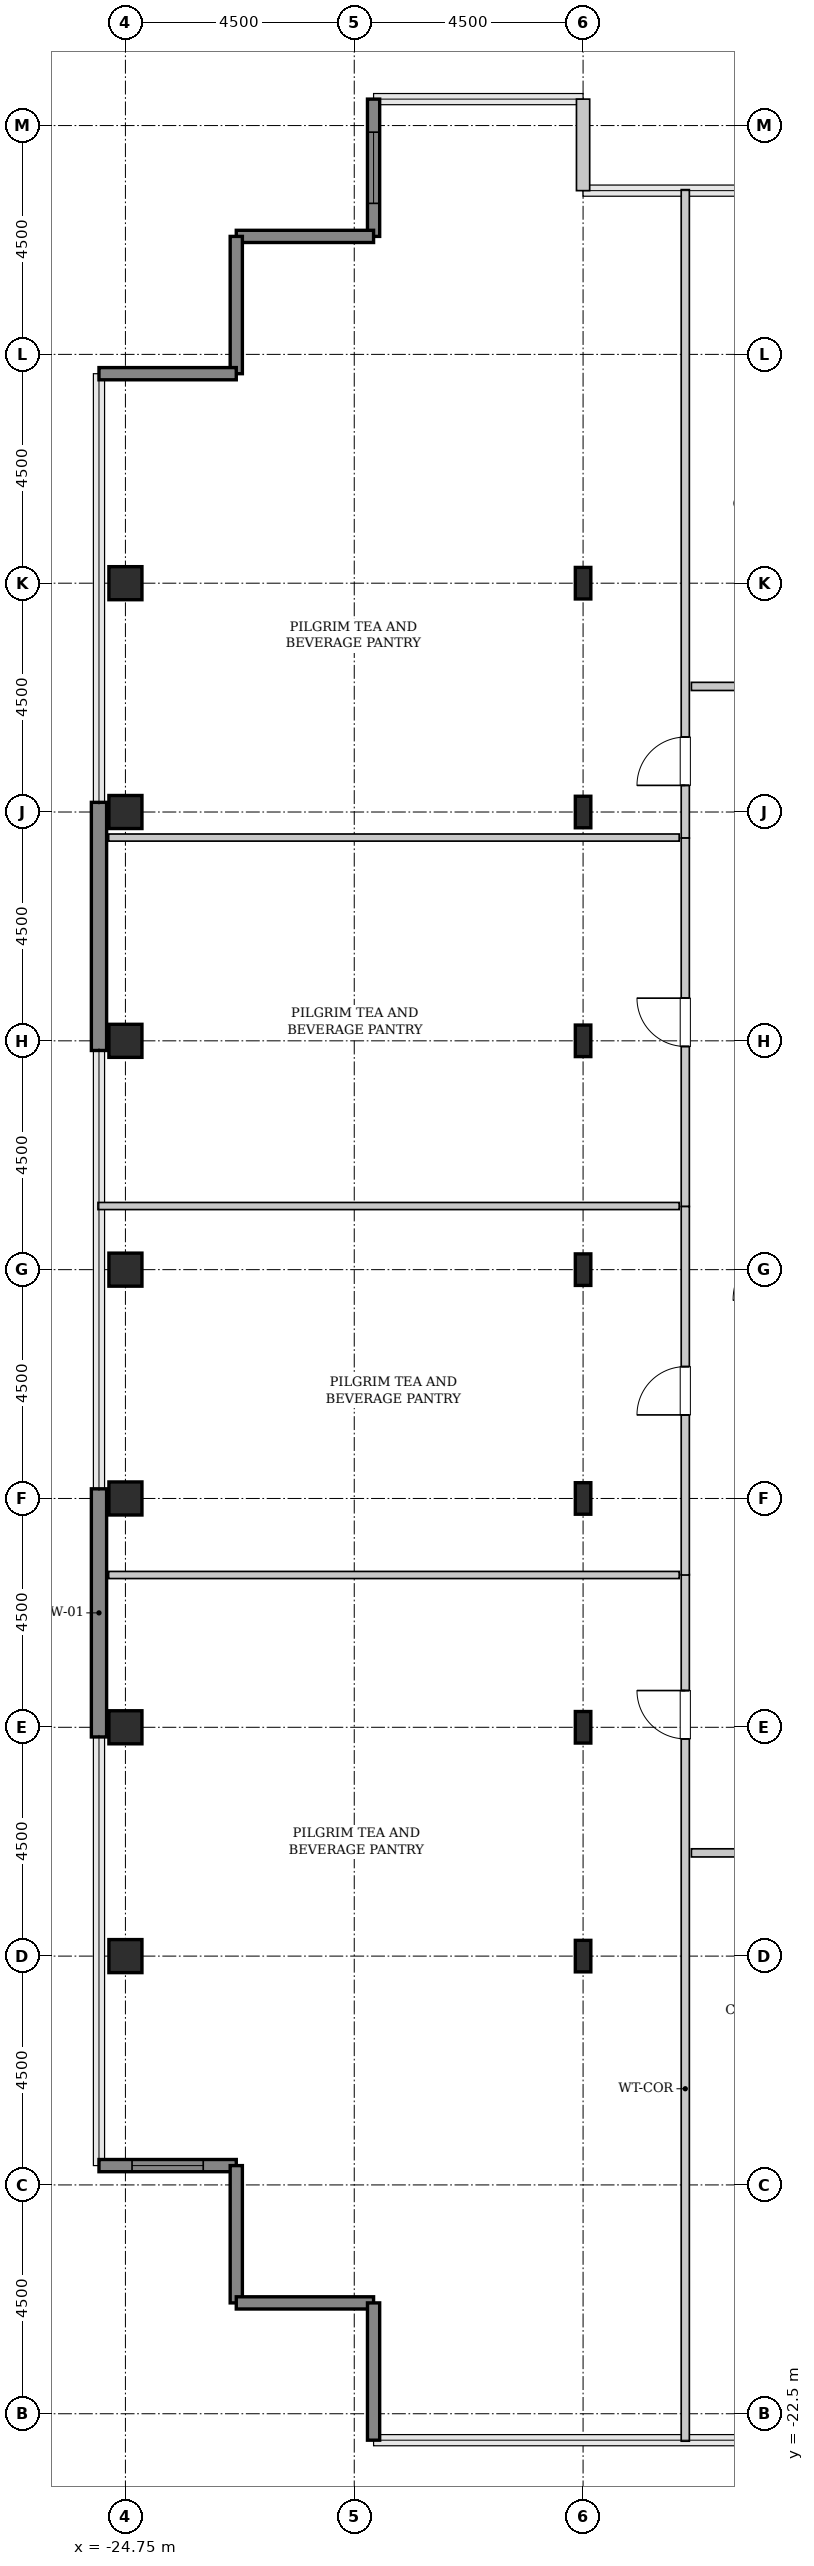
"""IFC4 building model, lengths in metres.
Left out: names, types, materials, properties, quantities, classifications, styles, units other than length and angle.
Written with IfcOpenShell. Run it as: python <this file> out.ifc"""

import sys

from ifc_helpers import new_model, si_unit, direction, frame, frame_2d, origin, origin_2d, place, context, subcontext, project, spatial, rectangle, hollow_rectangle, i_section, extrude, source, transform, mapped, element, fill, save


model = new_model("IFC4")
c1 = context("Model", 3, precision=1e-05, world=origin(), true_north=direction((0.0, 1.0)))
c2 = subcontext(c1, "Body", "Model", "MODEL_VIEW")
j1 = project(units=[si_unit("LENGTHUNIT", "METRE"), si_unit("PLANEANGLEUNIT", "RADIAN")], contexts=[c1])
p1 = place(None, origin())
s1 = spatial("IfcSite", under=j1, at=p1, CompositionType="ELEMENT")
p2 = place(p1, origin())
s2 = spatial("IfcBuilding", under=s1, at=p2, CompositionType="ELEMENT")
p3 = place(p2, frame((0.0, 0.0, 287.4)))
s3 = spatial("IfcBuildingStorey", under=s2, at=p3, CompositionType="ELEMENT", Elevation=287.4)
m1 = source(origin(), c2, "Body", "SweptSolid", [
    extrude(hollow_rectangle(XDim=0.65, YDim=0.65, WallThickness=0.032, InnerFilletRadius=0.032, OuterFilletRadius=0.064, at=origin_2d()), origin(), (0.0, 0.0, 1.0), 3.8),
])
for number, where, z_axis, x_axis in (
    (1, (-24.75, -13.5, 0.0), (0.0, 0.0, 1.0), (1.0, 0.0, 0.0)),
    (2, (-24.75, -9.0, 0.0), (0.0, 0.0, 1.0), (1.0, 0.0, 0.0)),
    (3, (-24.75, -4.5, 0.0), (0.0, 0.0, 1.0), (1.0, 0.0, 0.0)),
    (4, (-24.75, 0.0, 0.0), (0.0, 0.0, 1.0), (1.0, 0.0, 0.0)),
    (5, (-24.75, 4.5, 0.0), (0.0, 0.0, 1.0), (1.0, 0.0, 0.0)),
    (6, (-24.75, 9.0, 0.0), (0.0, 0.0, 1.0), (1.0, 0.0, 0.0)),
    (7, (-24.75, 13.5, 0.0), (0.0, 0.0, 1.0), (1.0, 0.0, 0.0)),
):
    element("IfcColumn", number, at=place(p3, frame(where, z_axis=z_axis, x_axis=x_axis)), inside=s3, PredefinedType="COLUMN", context=c2, shape_type="MappedRepresentation", body=[
        mapped(m1, transform((0.0, 0.0, 0.0), x_axis=(1.0, 0.0, 0.0), y_axis=(0.0, 1.0, 0.0), z_axis=(0.0, 0.0, 1.0), scale=1.0)),
    ])
m2 = source(origin(), c2, "Body", "SweptSolid", [
    extrude(i_section(OverallWidth=0.305, OverallDepth=0.62, WebThickness=0.021, FlangeThickness=0.04, FilletRadius=0.027, at=origin_2d()), origin(), (0.0, 0.0, 1.0), 3.8),
])
for number, where, z_axis, x_axis in (
    (8, (-15.75, -13.5, 0.0), (0.0, 0.0, 1.0), (1.0, 0.0, 0.0)),
    (9, (-15.75, -9.0, 0.0), (0.0, 0.0, 1.0), (1.0, 0.0, 0.0)),
    (10, (-15.75, -4.5, 0.0), (0.0, 0.0, 1.0), (1.0, 0.0, 0.0)),
    (11, (-15.75, 0.0, 0.0), (0.0, 0.0, 1.0), (1.0, 0.0, 0.0)),
    (12, (-15.75, 4.5, 0.0), (0.0, 0.0, 1.0), (1.0, 0.0, 0.0)),
    (13, (-15.75, 9.0, 0.0), (0.0, 0.0, 1.0), (1.0, 0.0, 0.0)),
    (14, (-15.75, 13.5, 0.0), (0.0, 0.0, 1.0), (1.0, 0.0, 0.0)),
):
    element("IfcColumn", number, at=place(p3, frame(where, z_axis=z_axis, x_axis=x_axis)), inside=s3, PredefinedType="COLUMN", context=c2, shape_type="MappedRepresentation", body=[
        mapped(m2, transform((0.0, 0.0, 0.0), x_axis=(1.0, 0.0, 0.0), y_axis=(0.0, 1.0, 0.0), z_axis=(0.0, 0.0, 1.0), scale=1.0)),
    ])
m3 = source(origin(), c2, "Body", "SweptSolid", [
    extrude(rectangle(XDim=4.88, YDim=0.3, at=frame_2d((2.44, 0.0))), origin(), (0.0, 0.0, 1.0), 3.55),
])
for number, where, z_axis, x_axis in (
    (15, (-25.27, -9.19, 0.0), (0.0, 0.0, 1.0), (0.0, 1.0, 0.0)),
    (16, (-25.27, 4.31, 0.0), (0.0, 0.0, 1.0), (0.0, 1.0, 0.0)),
):
    element("IfcWall", number, at=place(p3, frame(where, z_axis=z_axis, x_axis=x_axis)), inside=s3, PredefinedType="SHEAR", context=c2, shape_type="MappedRepresentation", body=[
        mapped(m3, transform((0.0, 0.0, 0.0), x_axis=(1.0, 0.0, 0.0), y_axis=(0.0, 1.0, 0.0), z_axis=(0.0, 0.0, 1.0), scale=1.0)),
    ])
m4 = source(origin(), c2, "Body", "SweptSolid", [
    extrude(rectangle(XDim=1.8, YDim=0.26, at=frame_2d((0.9, 0.0))), origin(), (0.0, 0.0, 1.0), 3.55),
])
p4 = place(p3, frame((-15.75, 21.22, 0.0), z_axis=(0.0, 0.0, 1.0), x_axis=(0.0, 1.0, 0.0)))
e17 = element("IfcWall", 17, at=p4, inside=s3, PredefinedType="SOLIDWALL", context=c2, shape_type="MappedRepresentation", body=[
    mapped(m4, transform((0.0, 0.0, 0.0), x_axis=(1.0, 0.0, 0.0), y_axis=(0.0, 1.0, 0.0), z_axis=(0.0, 0.0, 1.0), scale=1.0)),
])
m5 = source(origin(), c2, "Body", "SweptSolid", [
    extrude(rectangle(XDim=2.7, YDim=0.24, at=frame_2d((1.35, 0.0))), origin(), (0.0, 0.0, 1.0), 3.55),
])
p5 = place(p3, frame((-19.87, 23.02, 0.0), z_axis=(0.0, 0.0, 1.0), x_axis=(0.0, -1.0, 0.0)))
e18 = element("IfcWall", 18, at=p5, inside=s3, PredefinedType="SHEAR", context=c2, shape_type="MappedRepresentation", body=[
    mapped(m5, transform((0.0, 0.0, 0.0), x_axis=(1.0, 0.0, 0.0), y_axis=(0.0, 1.0, 0.0), z_axis=(0.0, 0.0, 1.0), scale=1.0)),
])
p6 = place(p5, frame((0.65, 0.0, 0.85)))
e19 = element("IfcOpeningElement", 19, at=p6, cuts=e18, PredefinedType="OPENING", context=c2, shape_type="SweptSolid", body=[
    extrude(rectangle(XDim=1.4, YDim=1.8, at=frame_2d((0.7, 0.9))), frame((0.0, 0.13, 0.0), z_axis=(0.0, -1.0, 0.0), x_axis=(1.0, 0.0, 0.0)), (0.0, 0.0, 1.0), 0.26),
])
for number, where, z_axis, x_axis in (
    (20, (-19.87, 20.32, 0.0), (0.0, 0.0, 1.0), (-1.0, 0.0, 0.0)),
    (21, (-22.57, 20.32, 0.0), (0.0, 0.0, 1.0), (0.0, -1.0, 0.0)),
    (22, (-22.57, 17.62, 0.0), (0.0, 0.0, 1.0), (-1.0, 0.0, 0.0)),
):
    element("IfcWall", number, at=place(p3, frame(where, z_axis=z_axis, x_axis=x_axis)), inside=s3, PredefinedType="SHEAR", context=c2, shape_type="MappedRepresentation", body=[
        mapped(m5, transform((0.0, 0.0, 0.0), x_axis=(1.0, 0.0, 0.0), y_axis=(0.0, 1.0, 0.0), z_axis=(0.0, 0.0, 1.0), scale=1.0)),
    ])
p7 = place(p3, frame((-25.27, -17.62, 0.0), z_axis=(0.0, 0.0, 1.0), x_axis=(1.0, 0.0, 0.0)))
e23 = element("IfcWall", 23, at=p7, inside=s3, PredefinedType="SHEAR", context=c2, shape_type="MappedRepresentation", body=[
    mapped(m5, transform((0.0, 0.0, 0.0), x_axis=(1.0, 0.0, 0.0), y_axis=(0.0, 1.0, 0.0), z_axis=(0.0, 0.0, 1.0), scale=1.0)),
])
p8 = place(p7, frame((0.65, 0.0, 0.85)))
e24 = element("IfcOpeningElement", 24, at=p8, cuts=e23, PredefinedType="OPENING", context=c2, shape_type="SweptSolid", body=[
    extrude(rectangle(XDim=1.4, YDim=1.8, at=frame_2d((0.7, 0.9))), frame((0.0, 0.13, 0.0), z_axis=(0.0, -1.0, 0.0), x_axis=(1.0, 0.0, 0.0)), (0.0, 0.0, 1.0), 0.26),
])
for number, where, z_axis, x_axis in (
    (25, (-22.57, -17.62, 0.0), (0.0, 0.0, 1.0), (0.0, -1.0, 0.0)),
    (26, (-22.57, -20.32, 0.0), (0.0, 0.0, 1.0), (1.0, 0.0, 0.0)),
    (27, (-19.87, -20.32, 0.0), (0.0, 0.0, 1.0), (0.0, -1.0, 0.0)),
):
    element("IfcWall", number, at=place(p3, frame(where, z_axis=z_axis, x_axis=x_axis)), inside=s3, PredefinedType="SHEAR", context=c2, shape_type="MappedRepresentation", body=[
        mapped(m5, transform((0.0, 0.0, 0.0), x_axis=(1.0, 0.0, 0.0), y_axis=(0.0, 1.0, 0.0), z_axis=(0.0, 0.0, 1.0), scale=1.0)),
    ])
m6 = source(origin(), c2, "Body", "SweptSolid", [
    extrude(rectangle(XDim=17.045, YDim=0.16, at=frame_2d((8.522, 0.0))), origin(), (0.0, 0.0, 1.0), 3.535),
])
p9 = place(p3, frame((-13.74, -23.04, 0.0), z_axis=(0.0, 0.0, 1.0), x_axis=(0.0, 1.0, 0.0)))
e28 = element("IfcWall", 28, at=p9, inside=s3, PredefinedType="PARTITIONING", context=c2, shape_type="MappedRepresentation", body=[
    mapped(m6, transform((0.0, 0.0, 0.0), x_axis=(1.0, 0.0, 0.0), y_axis=(0.0, 1.0, 0.0), z_axis=(0.0, 0.0, 1.0), scale=1.0)),
])
p10 = place(p9, frame((13.812, 0.0, 0.0)))
e29 = element("IfcOpeningElement", 29, at=p10, cuts=e28, PredefinedType="OPENING", context=c2, shape_type="SweptSolid", body=[
    extrude(rectangle(XDim=0.95, YDim=2.1, at=frame_2d((0.475, 1.05))), frame((0.0, 0.09, 0.0), z_axis=(0.0, -1.0, 0.0), x_axis=(1.0, 0.0, 0.0)), (0.0, 0.0, 1.0), 0.18),
])
m7 = source(origin(), c2, "Body", "SweptSolid", [
    extrude(rectangle(XDim=11.22, YDim=0.14, at=frame_2d((5.61, 0.0))), origin(), (0.0, 0.0, 1.0), 3.535),
])
p11 = place(p3, frame((-25.08, -6.005, 0.0), z_axis=(0.0, 0.0, 1.0), x_axis=(1.0, 0.0, 0.0)))
e30 = element("IfcWall", 30, at=p11, inside=s3, PredefinedType="PARTITIONING", context=c2, shape_type="MappedRepresentation", body=[
    mapped(m7, transform((0.0, 0.0, 0.0), x_axis=(1.0, 0.0, 0.0), y_axis=(0.0, 1.0, 0.0), z_axis=(0.0, 0.0, 1.0), scale=1.0)),
])
m8 = source(origin(), c2, "Body", "SweptSolid", [
    extrude(rectangle(XDim=12.752, YDim=0.16, at=frame_2d((6.376, 0.0))), origin(), (0.0, 0.0, 1.0), 3.535),
])
p12 = place(p3, frame((-13.74, 8.488, 0.0), z_axis=(0.0, 0.0, 1.0), x_axis=(0.0, 1.0, 0.0)))
e31 = element("IfcWall", 31, at=p12, inside=s3, PredefinedType="PARTITIONING", context=c2, shape_type="MappedRepresentation", body=[
    mapped(m8, transform((0.0, 0.0, 0.0), x_axis=(1.0, 0.0, 0.0), y_axis=(0.0, 1.0, 0.0), z_axis=(0.0, 0.0, 1.0), scale=1.0)),
])
p13 = place(p12, frame((1.036, 0.0, 0.0)))
e32 = element("IfcOpeningElement", 32, at=p13, cuts=e31, PredefinedType="OPENING", context=c2, shape_type="SweptSolid", body=[
    extrude(rectangle(XDim=0.95, YDim=2.1, at=frame_2d((0.475, 1.05))), frame((0.0, 0.09, 0.0), z_axis=(0.0, -1.0, 0.0), x_axis=(1.0, 0.0, 0.0)), (0.0, 0.0, 1.0), 0.18),
])
m9 = source(origin(), c2, "Body", "SweptSolid", [
    extrude(rectangle(XDim=11.22, YDim=0.14, at=frame_2d((5.61, 0.0))), origin(), (0.0, 0.0, 1.0), 2.925),
])
p14 = place(p3, frame((-25.08, 8.498, 0.0), z_axis=(0.0, 0.0, 1.0), x_axis=(1.0, 0.0, 0.0)))
e33 = element("IfcWall", 33, at=p14, inside=s3, PredefinedType="PARTITIONING", context=c2, shape_type="MappedRepresentation", body=[
    mapped(m9, transform((0.0, 0.0, 0.0), x_axis=(1.0, 0.0, 0.0), y_axis=(0.0, 1.0, 0.0), z_axis=(0.0, 0.0, 1.0), scale=1.0)),
])
m10 = source(origin(), c2, "Body", "SweptSolid", [
    extrude(rectangle(XDim=7.246, YDim=0.16, at=frame_2d((3.623, 0.0))), origin(), (0.0, 0.0, 1.0), 3.535),
])
p15 = place(p3, frame((-13.74, 1.241, 0.0), z_axis=(0.0, 0.0, 1.0), x_axis=(0.0, 1.0, 0.0)))
e34 = element("IfcWall", 34, at=p15, inside=s3, PredefinedType="PARTITIONING", context=c2, shape_type="MappedRepresentation", body=[
    mapped(m10, transform((0.0, 0.0, 0.0), x_axis=(1.0, 0.0, 0.0), y_axis=(0.0, 1.0, 0.0), z_axis=(0.0, 0.0, 1.0), scale=1.0)),
])
p16 = place(p15, frame((3.148, 0.0, 0.0)))
e35 = element("IfcOpeningElement", 35, at=p16, cuts=e34, PredefinedType="OPENING", context=c2, shape_type="SweptSolid", body=[
    extrude(rectangle(XDim=0.95, YDim=2.1, at=frame_2d((0.475, 1.05))), frame((0.0, 0.09, 0.0), z_axis=(0.0, -1.0, 0.0), x_axis=(1.0, 0.0, 0.0)), (0.0, 0.0, 1.0), 0.18),
])
m11 = source(origin(), c2, "Body", "SweptSolid", [
    extrude(rectangle(XDim=11.43, YDim=0.14, at=frame_2d((5.715, 0.0))), origin(), (0.0, 0.0, 1.0), 3.535),
])
p17 = place(p3, frame((-25.29, 1.251, 0.0), z_axis=(0.0, 0.0, 1.0), x_axis=(1.0, 0.0, 0.0)))
e36 = element("IfcWall", 36, at=p17, inside=s3, PredefinedType="PARTITIONING", context=c2, shape_type="MappedRepresentation", body=[
    mapped(m11, transform((0.0, 0.0, 0.0), x_axis=(1.0, 0.0, 0.0), y_axis=(0.0, 1.0, 0.0), z_axis=(0.0, 0.0, 1.0), scale=1.0)),
])
m12 = source(origin(), c2, "Body", "SweptSolid", [
    extrude(rectangle(XDim=7.246, YDim=0.16, at=frame_2d((3.623, 0.0))), origin(), (0.0, 0.0, 1.0), 3.535),
])
p18 = place(p3, frame((-13.74, -6.005, 0.0), z_axis=(0.0, 0.0, 1.0), x_axis=(0.0, 1.0, 0.0)))
e37 = element("IfcWall", 37, at=p18, inside=s3, PredefinedType="PARTITIONING", context=c2, shape_type="MappedRepresentation", body=[
    mapped(m12, transform((0.0, 0.0, 0.0), x_axis=(1.0, 0.0, 0.0), y_axis=(0.0, 1.0, 0.0), z_axis=(0.0, 0.0, 1.0), scale=1.0)),
])
p19 = place(p18, frame((3.148, 0.0, 0.0)))
e38 = element("IfcOpeningElement", 38, at=p19, cuts=e37, PredefinedType="OPENING", context=c2, shape_type="SweptSolid", body=[
    extrude(rectangle(XDim=0.95, YDim=2.1, at=frame_2d((0.475, 1.05))), frame((0.0, 0.09, 0.0), z_axis=(0.0, -1.0, 0.0), x_axis=(1.0, 0.0, 0.0)), (0.0, 0.0, 1.0), 0.18),
])
m13 = source(origin(), c2, "Body", "SweptSolid", [
    extrude(rectangle(XDim=4.125, YDim=0.16, at=frame_2d((2.062, 0.0))), origin(), (0.0, 0.0, 1.0), 3.535),
])
p20 = place(p3, frame((-13.62, 11.47, 0.0), z_axis=(0.0, 0.0, 1.0), x_axis=(1.0, 0.0, 0.0)))
e39 = element("IfcWall", 39, at=p20, inside=s3, PredefinedType="PARTITIONING", context=c2, shape_type="MappedRepresentation", body=[
    mapped(m13, transform((0.0, 0.0, 0.0), x_axis=(1.0, 0.0, 0.0), y_axis=(0.0, 1.0, 0.0), z_axis=(0.0, 0.0, 1.0), scale=1.0)),
])
p21 = place(p20, frame((1.587, 0.0, 0.0)))
e40 = element("IfcOpeningElement", 40, at=p21, cuts=e39, PredefinedType="OPENING", context=c2, shape_type="SweptSolid", body=[
    extrude(rectangle(XDim=0.95, YDim=2.1, at=frame_2d((0.475, 1.05))), frame((0.0, 0.09, 0.0), z_axis=(0.0, -1.0, 0.0), x_axis=(1.0, 0.0, 0.0)), (0.0, 0.0, 1.0), 0.18),
])
m14 = source(origin(), c2, "Body", "SweptSolid", [
    extrude(rectangle(XDim=3.825, YDim=0.16, at=frame_2d((1.913, 0.0))), origin(), (0.0, 0.0, 1.0), 3.535),
])
p22 = place(p3, frame((-13.62, -11.47, 0.0), z_axis=(0.0, 0.0, 1.0), x_axis=(1.0, 0.0, 0.0)))
e41 = element("IfcWall", 41, at=p22, inside=s3, PredefinedType="PARTITIONING", context=c2, shape_type="MappedRepresentation", body=[
    mapped(m14, transform((0.0, 0.0, 0.0), x_axis=(1.0, 0.0, 0.0), y_axis=(0.0, 1.0, 0.0), z_axis=(0.0, 0.0, 1.0), scale=1.0)),
])
p23 = place(p22, frame((1.438, 0.0, 0.0)))
e42 = element("IfcOpeningElement", 42, at=p23, cuts=e41, PredefinedType="OPENING", context=c2, shape_type="SweptSolid", body=[
    extrude(rectangle(XDim=0.95, YDim=2.1, at=frame_2d((0.475, 1.05))), frame((0.0, 0.09, 0.0), z_axis=(0.0, -1.0, 0.0), x_axis=(1.0, 0.0, 0.0)), (0.0, 0.0, 1.0), 0.18),
])
m15 = source(origin(), c2, "Body", "SweptSolid", [
    extrude(rectangle(XDim=1.4, YDim=1.8, at=frame_2d((0.7, 0.9))), frame((0.0, 0.03, 0.0), z_axis=(0.0, -1.0, 0.0), x_axis=(1.0, 0.0, 0.0)), (0.0, 0.0, 1.0), 0.06),
])
p24 = place(p6, origin())
e43 = element("IfcWindow", 43, at=p24, inside=s3, PartitioningType="SINGLE_PANEL", PredefinedType="WINDOW", context=c2, shape_type="MappedRepresentation", body=[
    mapped(m15, transform((0.0, 0.0, 0.0), x_axis=(1.0, 0.0, 0.0), y_axis=(0.0, 1.0, 0.0), z_axis=(0.0, 0.0, 1.0), scale=1.0)),
])
fill(e19, e43)
p25 = place(p8, origin())
e44 = element("IfcWindow", 44, at=p25, inside=s3, PartitioningType="SINGLE_PANEL", PredefinedType="WINDOW", context=c2, shape_type="MappedRepresentation", body=[
    mapped(m15, transform((0.0, 0.0, 0.0), x_axis=(1.0, 0.0, 0.0), y_axis=(0.0, 1.0, 0.0), z_axis=(0.0, 0.0, 1.0), scale=1.0)),
])
fill(e24, e44)
m16 = source(origin(), c2, "Body", "SweptSolid", [
    extrude(rectangle(XDim=0.95, YDim=2.1, at=frame_2d((0.475, 1.05))), frame((0.0, 0.025, 0.0), z_axis=(0.0, -1.0, 0.0), x_axis=(1.0, 0.0, 0.0)), (0.0, 0.0, 1.0), 0.05),
])
p26 = place(p10, origin())
e45 = element("IfcDoor", 45, at=p26, inside=s3, OperationType="SINGLE_SWING_RIGHT", PredefinedType="DOOR", context=c2, shape_type="MappedRepresentation", body=[
    mapped(m16, transform((0.0, 0.0, 0.0), x_axis=(1.0, 0.0, 0.0), y_axis=(0.0, 1.0, 0.0), z_axis=(0.0, 0.0, 1.0), scale=1.0)),
])
fill(e29, e45)
p27 = place(p13, origin())
e46 = element("IfcDoor", 46, at=p27, inside=s3, OperationType="SINGLE_SWING_LEFT", PredefinedType="DOOR", context=c2, shape_type="MappedRepresentation", body=[
    mapped(m16, transform((0.0, 0.0, 0.0), x_axis=(1.0, 0.0, 0.0), y_axis=(0.0, 1.0, 0.0), z_axis=(0.0, 0.0, 1.0), scale=1.0)),
])
fill(e32, e46)
p28 = place(p16, origin())
e47 = element("IfcDoor", 47, at=p28, inside=s3, OperationType="SINGLE_SWING_RIGHT", PredefinedType="DOOR", context=c2, shape_type="MappedRepresentation", body=[
    mapped(m16, transform((0.0, 0.0, 0.0), x_axis=(1.0, 0.0, 0.0), y_axis=(0.0, 1.0, 0.0), z_axis=(0.0, 0.0, 1.0), scale=1.0)),
])
fill(e35, e47)
p29 = place(p19, origin())
e48 = element("IfcDoor", 48, at=p29, inside=s3, OperationType="SINGLE_SWING_LEFT", PredefinedType="DOOR", context=c2, shape_type="MappedRepresentation", body=[
    mapped(m16, transform((0.0, 0.0, 0.0), x_axis=(1.0, 0.0, 0.0), y_axis=(0.0, 1.0, 0.0), z_axis=(0.0, 0.0, 1.0), scale=1.0)),
])
fill(e38, e48)
save(model, sys.argv[1])
